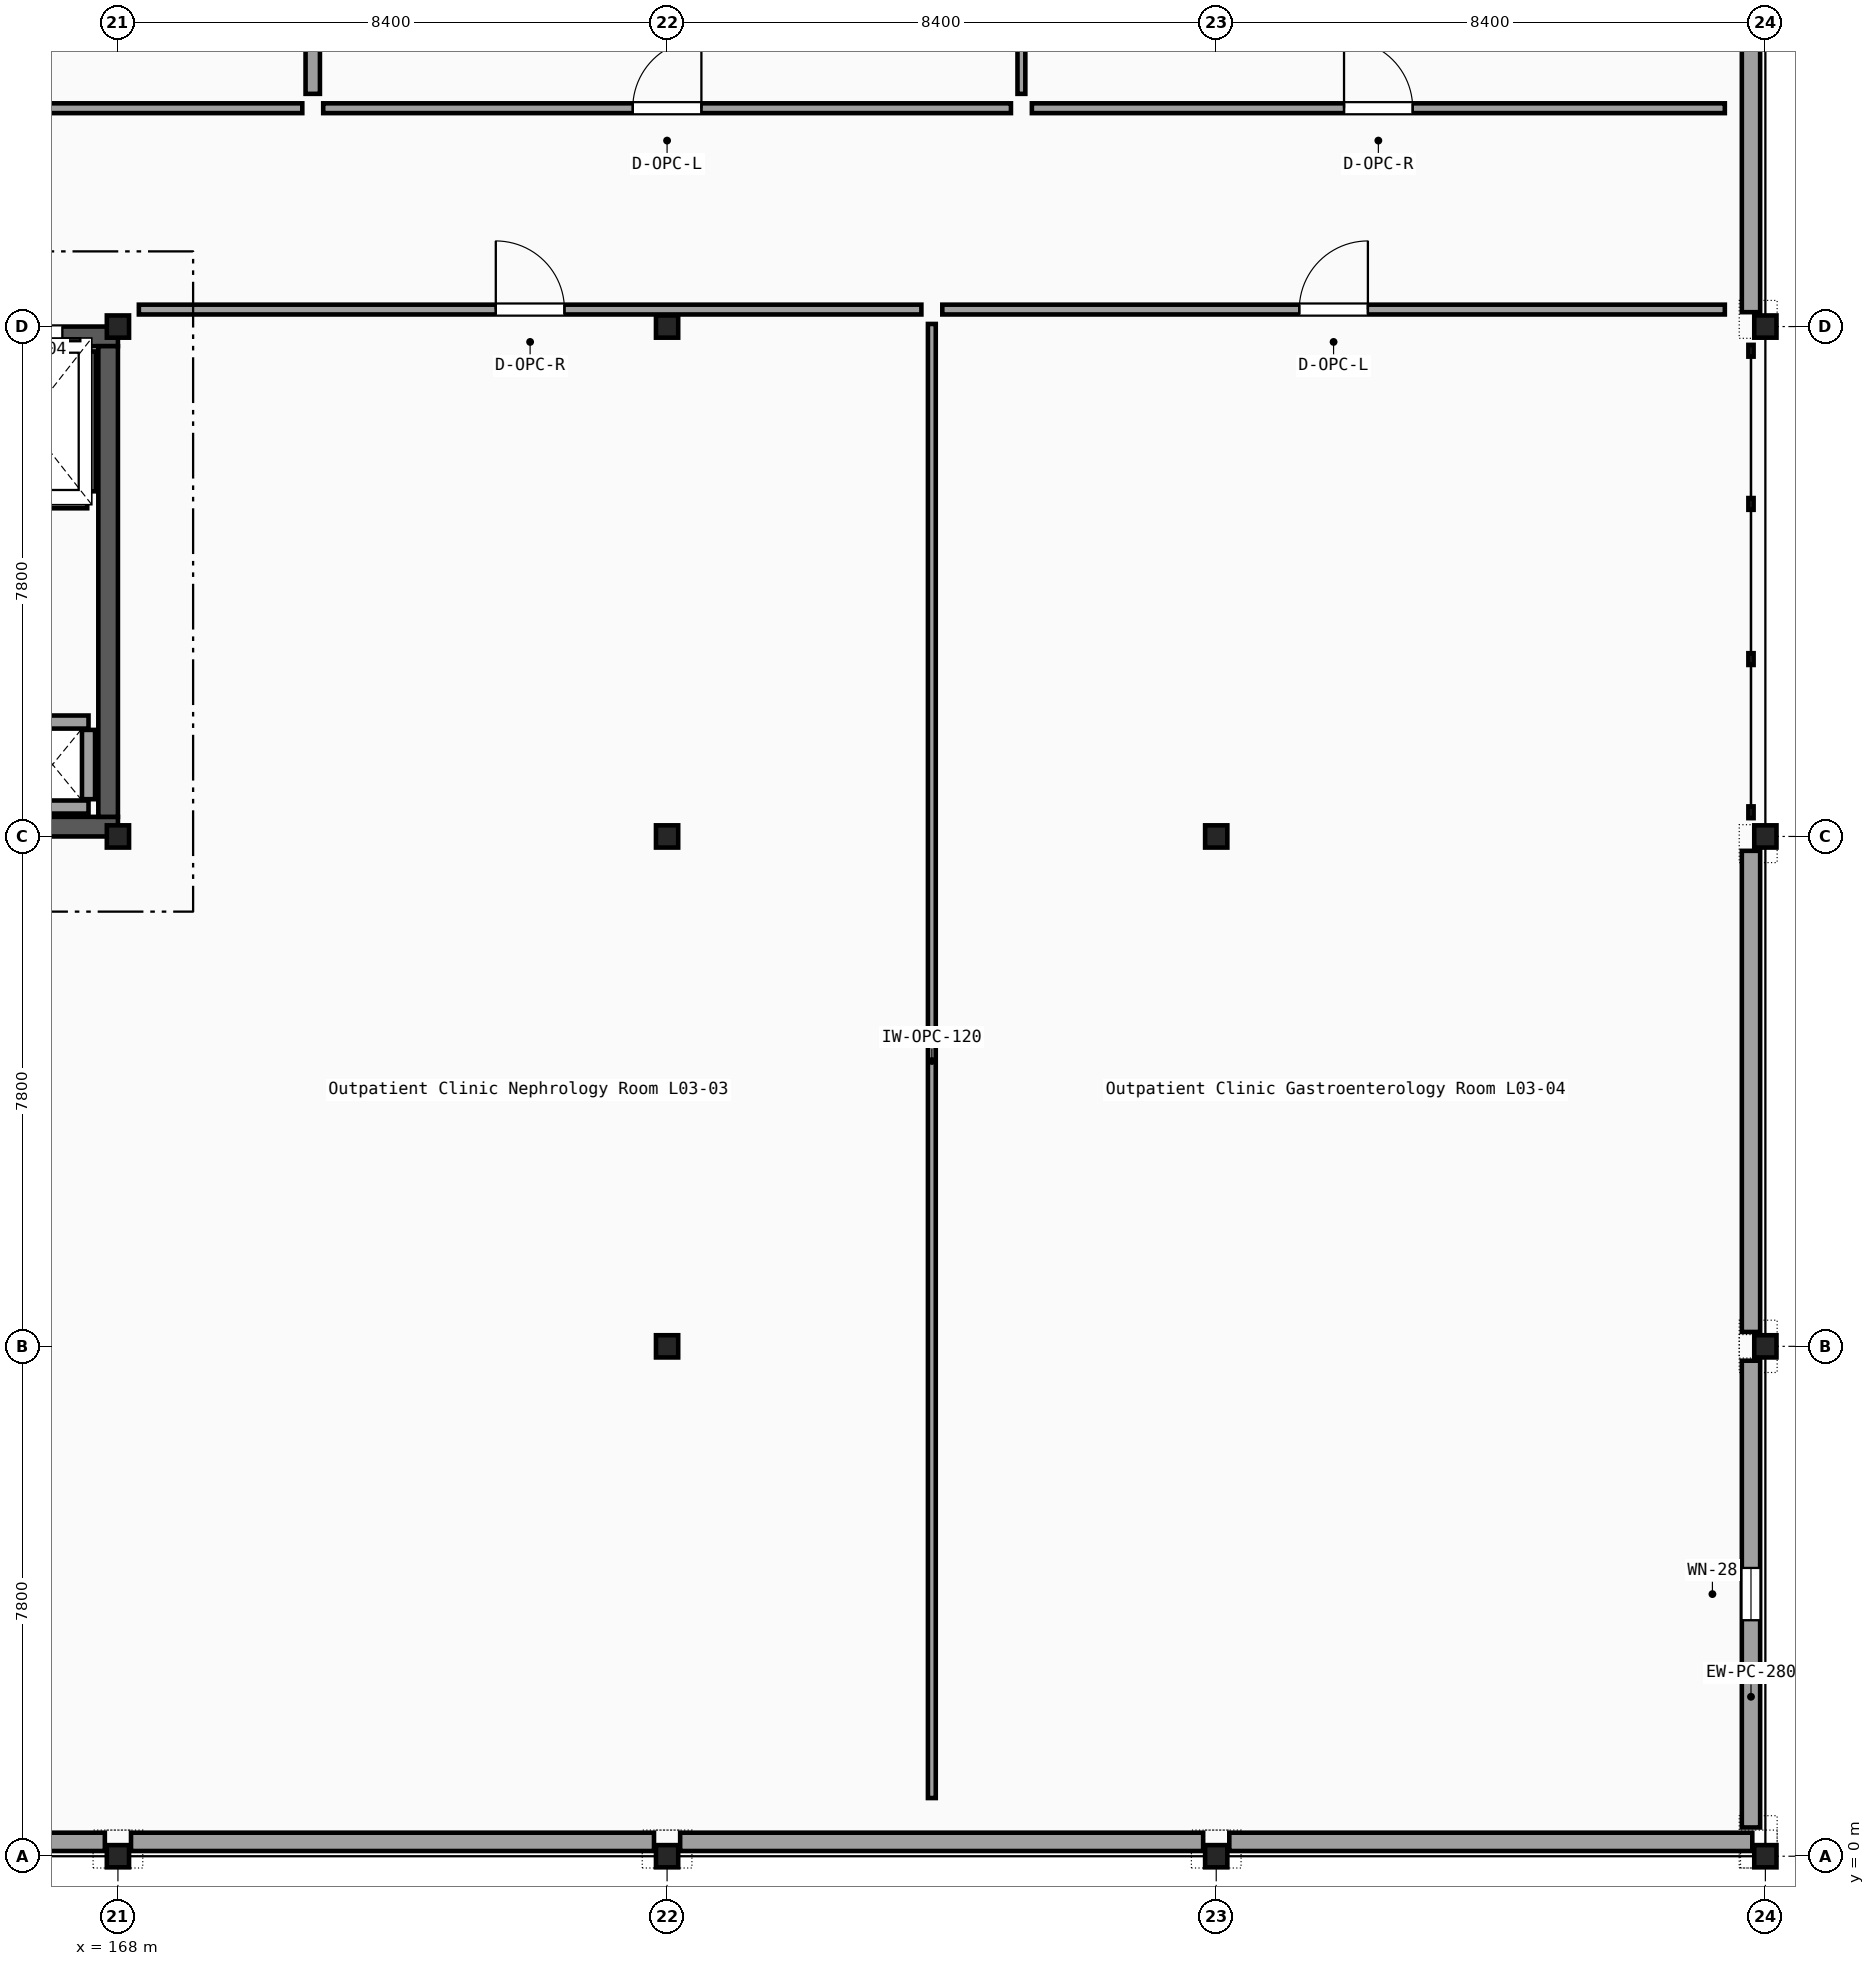
"""IFC4 building model, lengths in metres.
Left out: names, types, materials, properties, quantities, classifications, styles, units other than length and angle.
Written with IfcOpenShell. Run it as: python <this file> out.ifc"""

import sys

from ifc_helpers import new_model, si_unit, direction, frame, frame_2d, origin, origin_2d, place, context, subcontext, project, spatial, rectangle, i_section, extrude, element, fill, save


model = new_model("IFC4")
c1 = context("Model", 3, precision=1e-05, world=origin(), true_north=direction((0.0, 1.0)))
c2 = subcontext(c1, "Body", "Model", "MODEL_VIEW")
j1 = project(units=[si_unit("LENGTHUNIT", "METRE"), si_unit("PLANEANGLEUNIT", "RADIAN")], contexts=[c1])
p1 = place(None, origin())
s1 = spatial("IfcSite", under=j1, at=p1, CompositionType="ELEMENT")
p2 = place(p1, origin())
s2 = spatial("IfcBuilding", under=s1, at=p2, CompositionType="ELEMENT")
p3 = place(p2, frame((0.0, 0.0, 14.85)))
s3 = spatial("IfcBuildingStorey", under=s2, at=p3, CompositionType="ELEMENT", Elevation=14.85)
for number, where, z_axis, x_axis in (
    (1, (168.0, 0.0, 0.0), (0.0, 0.0, 1.0), (1.0, 0.0, 0.0)),
    (2, (168.0, 15.6, 0.0), (0.0, 0.0, 1.0), (1.0, 0.0, 0.0)),
    (3, (168.0, 23.4, 0.0), (0.0, 0.0, 1.0), (1.0, 0.0, 0.0)),
    (4, (176.4, 0.0, 0.0), (0.0, 0.0, 1.0), (1.0, 0.0, 0.0)),
    (5, (176.4, 7.8, 0.0), (0.0, 0.0, 1.0), (1.0, 0.0, 0.0)),
    (6, (176.4, 15.6, 0.0), (0.0, 0.0, 1.0), (1.0, 0.0, 0.0)),
    (7, (176.4, 23.4, 0.0), (0.0, 0.0, 1.0), (1.0, 0.0, 0.0)),
    (8, (184.8, 0.0, 0.0), (0.0, 0.0, 1.0), (1.0, 0.0, 0.0)),
    (9, (184.8, 15.6, 0.0), (0.0, 0.0, 1.0), (1.0, 0.0, 0.0)),
    (10, (193.2, 0.0, 0.0), (0.0, 0.0, 1.0), (1.0, 0.0, 0.0)),
    (11, (193.2, 7.8, 0.0), (0.0, 0.0, 1.0), (1.0, 0.0, 0.0)),
    (12, (193.2, 15.6, 0.0), (0.0, 0.0, 1.0), (1.0, 0.0, 0.0)),
    (13, (193.2, 23.4, 0.0), (0.0, 0.0, 1.0), (1.0, 0.0, 0.0)),
):
    element("IfcColumn", number, at=place(p3, frame(where, z_axis=z_axis, x_axis=x_axis)), inside=s3, PredefinedType="COLUMN", context=c2, shape_type="SweptSolid", body=[
        extrude(i_section(OverallWidth=0.3, OverallDepth=0.34, WebThickness=0.012, FlangeThickness=0.021, FilletRadius=0.027, at=origin_2d()), origin(), (0.0, 0.0, 1.0), 4.05),
    ])
p4 = place(p3, frame((159.8, 0.22, 0.0), z_axis=(0.0, 0.0, 1.0), x_axis=(1.0, 0.0, 0.0)))
e14 = element("IfcWall", 14, at=p4, inside=s3, PredefinedType="SOLIDWALL", context=c2, shape_type="SweptSolid", body=[
    extrude(rectangle(XDim=8.0, YDim=0.28, at=frame_2d((4.0, 0.0))), origin(), (0.0, 0.0, 1.0), 3.4),
])
p5 = place(p4, frame((3.15, 0.0, 0.95)))
e15 = element("IfcOpeningElement", 15, at=p5, cuts=e14, PredefinedType="OPENING", context=c2, shape_type="SweptSolid", body=[
    extrude(rectangle(XDim=1.7, YDim=1.55, at=frame_2d((0.85, 0.775))), frame((0.0, 0.15, 0.0), z_axis=(0.0, -1.0, 0.0), x_axis=(1.0, 0.0, 0.0)), (0.0, 0.0, 1.0), 0.3),
])
for number, where, z_axis, x_axis in (
    (16, (168.2, 0.22, 0.0), (0.0, 0.0, 1.0), (1.0, 0.0, 0.0)),
    (17, (176.6, 0.22, 0.0), (0.0, 0.0, 1.0), (1.0, 0.0, 0.0)),
    (18, (185.0, 0.22, 0.0), (0.0, 0.0, 1.0), (1.0, 0.0, 0.0)),
):
    element("IfcWall", number, at=place(p3, frame(where, z_axis=z_axis, x_axis=x_axis)), inside=s3, PredefinedType="SOLIDWALL", context=c2, shape_type="SweptSolid", body=[
        extrude(rectangle(XDim=8.0, YDim=0.28, at=frame_2d((4.0, 0.0))), origin(), (0.0, 0.0, 1.0), 3.4),
    ])
p6 = place(p3, frame((192.98, 0.44, 0.0), z_axis=(0.0, 0.0, 1.0), x_axis=(0.0, 1.0, 0.0)))
e19 = element("IfcWall", 19, at=p6, inside=s3, PredefinedType="SOLIDWALL", context=c2, shape_type="SweptSolid", body=[
    extrude(rectangle(XDim=7.14, YDim=0.28, at=frame_2d((3.57, 0.0))), origin(), (0.0, 0.0, 1.0), 3.3),
])
p7 = place(p6, frame((3.17, 0.0, 0.95)))
e20 = element("IfcOpeningElement", 20, at=p7, cuts=e19, PredefinedType="OPENING", context=c2, shape_type="SweptSolid", body=[
    extrude(rectangle(XDim=0.8, YDim=1.65, at=frame_2d((0.4, 0.825))), frame((0.0, 0.15, 0.0), z_axis=(0.0, -1.0, 0.0), x_axis=(1.0, 0.0, 0.0)), (0.0, 0.0, 1.0), 0.3),
])
for number, where, z_axis, x_axis in (
    (21, (192.98, 8.02, 0.0), (0.0, 0.0, 1.0), (0.0, 1.0, 0.0)),
    (22, (192.98, 23.62, 0.0), (0.0, 0.0, 1.0), (0.0, 1.0, 0.0)),
):
    element("IfcWall", number, at=place(p3, frame(where, z_axis=z_axis, x_axis=x_axis)), inside=s3, PredefinedType="SOLIDWALL", context=c2, shape_type="SweptSolid", body=[
        extrude(rectangle(XDim=7.36, YDim=0.28, at=frame_2d((3.68, 0.0))), origin(), (0.0, 0.0, 1.0), 3.3),
    ])
p8 = place(p3, frame((159.6, 15.75, 0.0), z_axis=(0.0, 0.0, 1.0), x_axis=(1.0, 0.0, 0.0)))
e23 = element("IfcWall", 23, at=p8, inside=s3, PredefinedType="SHEAR", context=c2, shape_type="SweptSolid", body=[
    extrude(rectangle(XDim=8.4, YDim=0.3, at=frame_2d((4.2, 0.0))), origin(), (0.0, 0.0, 1.0), 3.82),
])
p9 = place(p3, frame((159.6, 23.25, 0.0), z_axis=(0.0, 0.0, 1.0), x_axis=(1.0, 0.0, 0.0)))
e24 = element("IfcWall", 24, at=p9, inside=s3, PredefinedType="SHEAR", context=c2, shape_type="SweptSolid", body=[
    extrude(rectangle(XDim=8.4, YDim=0.3, at=frame_2d((4.2, 0.0))), origin(), (0.0, 0.0, 1.0), 3.82),
])
p10 = place(p9, frame((1.38, 0.0, 0.0)))
e25 = element("IfcOpeningElement", 25, at=p10, cuts=e24, PredefinedType="OPENING", context=c2, shape_type="SweptSolid", body=[
    extrude(rectangle(XDim=1.2, YDim=2.15, at=frame_2d((0.6, 1.075))), frame((0.0, 0.16, 0.0), z_axis=(0.0, -1.0, 0.0), x_axis=(1.0, 0.0, 0.0)), (0.0, 0.0, 1.0), 0.32),
])
p11 = place(p9, frame((4.43, 0.0, 0.0)))
e26 = element("IfcOpeningElement", 26, at=p11, cuts=e24, PredefinedType="OPENING", context=c2, shape_type="SweptSolid", body=[
    extrude(rectangle(XDim=1.1, YDim=2.15, at=frame_2d((0.55, 1.075))), frame((0.0, 0.16, 0.0), z_axis=(0.0, -1.0, 0.0), x_axis=(1.0, 0.0, 0.0)), (0.0, 0.0, 1.0), 0.32),
])
p12 = place(p9, frame((6.45, 0.0, 0.0)))
e27 = element("IfcOpeningElement", 27, at=p12, cuts=e24, PredefinedType="OPENING", context=c2, shape_type="SweptSolid", body=[
    extrude(rectangle(XDim=1.1, YDim=2.15, at=frame_2d((0.55, 1.075))), frame((0.0, 0.16, 0.0), z_axis=(0.0, -1.0, 0.0), x_axis=(1.0, 0.0, 0.0)), (0.0, 0.0, 1.0), 0.32),
])
p13 = place(p3, frame((167.85, 15.9, 0.0), z_axis=(0.0, 0.0, 1.0), x_axis=(0.0, 1.0, 0.0)))
e28 = element("IfcWall", 28, at=p13, inside=s3, PredefinedType="SHEAR", context=c2, shape_type="SweptSolid", body=[
    extrude(rectangle(XDim=7.2, YDim=0.3, at=frame_2d((3.6, 0.0))), origin(), (0.0, 0.0, 1.0), 3.82),
])
for number, where, z_axis, x_axis in (
    (29, (166.45, 16.05, 0.0), (0.0, 0.0, 1.0), (1.0, 0.0, 0.0)),
    (30, (166.45, 17.35, 0.0), (0.0, 0.0, 1.0), (1.0, 0.0, 0.0)),
):
    element("IfcWall", number, at=place(p3, frame(where, z_axis=z_axis, x_axis=x_axis)), inside=s3, PredefinedType="PARTITIONING", context=c2, shape_type="SweptSolid", body=[
        extrude(rectangle(XDim=1.1, YDim=0.2, at=frame_2d((0.55, 0.0))), origin(), (0.0, 0.0, 1.0), 3.2),
    ])
p14 = place(p3, frame((167.55, 16.17, 0.0), z_axis=(0.0, 0.0, 1.0), x_axis=(0.0, 1.0, 0.0)))
e31 = element("IfcWall", 31, at=p14, inside=s3, PredefinedType="PARTITIONING", context=c2, shape_type="SweptSolid", body=[
    extrude(rectangle(XDim=1.06, YDim=0.2, at=frame_2d((0.53, 0.0))), origin(), (0.0, 0.0, 1.0), 3.2),
])
p15 = place(p3, frame((167.56, 20.88, 0.0), z_axis=(0.0, 0.0, 1.0), x_axis=(0.0, 1.0, 0.0)))
e32 = element("IfcWall", 32, at=p15, inside=s3, PredefinedType="PARTITIONING", context=c2, shape_type="SweptSolid", body=[
    extrude(rectangle(XDim=2.14, YDim=0.2, at=frame_2d((1.07, 0.0))), origin(), (0.0, 0.0, 1.0), 3.2),
])
p16 = place(p3, frame((165.67, 20.72, 0.0), z_axis=(0.0, 0.0, 1.0), x_axis=(1.0, 0.0, 0.0)))
e33 = element("IfcWall", 33, at=p16, inside=s3, PredefinedType="PARTITIONING", context=c2, shape_type="SweptSolid", body=[
    extrude(rectangle(XDim=1.86, YDim=0.2, at=frame_2d((0.93, 0.0))), origin(), (0.0, 0.0, 1.0), 3.2),
])
p17 = place(p3, frame((168.32, 23.66, 0.0), z_axis=(0.0, 0.0, 1.0), x_axis=(1.0, 0.0, 0.0)))
e34 = element("IfcWall", 34, at=p17, inside=s3, PredefinedType="PARTITIONING", context=c2, shape_type="SweptSolid", body=[
    extrude(rectangle(XDim=11.97, YDim=0.15, at=frame_2d((5.985, 0.0))), origin(), (0.0, 0.0, 1.0), 3.3),
])
p18 = place(p17, frame((5.46, 0.0, 0.0)))
e35 = element("IfcOpeningElement", 35, at=p18, cuts=e34, PredefinedType="OPENING", context=c2, shape_type="SweptSolid", body=[
    extrude(rectangle(XDim=1.05, YDim=2.15, at=frame_2d((0.525, 1.075))), frame((0.0, 0.085, 0.0), z_axis=(0.0, -1.0, 0.0), x_axis=(1.0, 0.0, 0.0)), (0.0, 0.0, 1.0), 0.17),
])
p19 = place(p3, frame((180.45, 0.89, 0.0), z_axis=(0.0, 0.0, 1.0), x_axis=(0.0, 1.0, 0.0)))
e36 = element("IfcWall", 36, at=p19, inside=s3, PredefinedType="PARTITIONING", context=c2, shape_type="SweptSolid", body=[
    extrude(rectangle(XDim=22.55, YDim=0.12, at=frame_2d((11.275, 0.0))), origin(), (0.0, 0.0, 1.0), 3.3),
])
p20 = place(p3, frame((180.61, 23.66, 0.0), z_axis=(0.0, 0.0, 1.0), x_axis=(1.0, 0.0, 0.0)))
e37 = element("IfcWall", 37, at=p20, inside=s3, PredefinedType="PARTITIONING", context=c2, shape_type="SweptSolid", body=[
    extrude(rectangle(XDim=11.97, YDim=0.15, at=frame_2d((5.985, 0.0))), origin(), (0.0, 0.0, 1.0), 3.3),
])
p21 = place(p20, frame((5.46, 0.0, 0.0)))
e38 = element("IfcOpeningElement", 38, at=p21, cuts=e37, PredefinedType="OPENING", context=c2, shape_type="SweptSolid", body=[
    extrude(rectangle(XDim=1.05, YDim=2.15, at=frame_2d((0.525, 1.075))), frame((0.0, 0.085, 0.0), z_axis=(0.0, -1.0, 0.0), x_axis=(1.0, 0.0, 0.0)), (0.0, 0.0, 1.0), 0.17),
])
p22 = place(p3, frame((160.22, 26.74, 0.0), z_axis=(0.0, 0.0, 1.0), x_axis=(1.0, 0.0, 0.0)))
e39 = element("IfcWall", 39, at=p22, inside=s3, PredefinedType="PARTITIONING", context=c2, shape_type="SweptSolid", body=[
    extrude(rectangle(XDim=10.6, YDim=0.15, at=frame_2d((5.3, 0.0))), origin(), (0.0, 0.0, 1.0), 3.4),
])
p23 = place(p22, frame((4.4, 0.0, 0.0)))
e40 = element("IfcOpeningElement", 40, at=p23, cuts=e39, PredefinedType="OPENING", context=c2, shape_type="SweptSolid", body=[
    extrude(rectangle(XDim=1.8, YDim=2.4, at=frame_2d((0.9, 1.2))), frame((0.0, 0.085, 0.0), z_axis=(0.0, -1.0, 0.0), x_axis=(1.0, 0.0, 0.0)), (0.0, 0.0, 1.0), 0.17),
])
p24 = place(p3, frame((170.98, 26.96, 0.0), z_axis=(0.0, 0.0, 1.0), x_axis=(0.0, 1.0, 0.0)))
e41 = element("IfcWall", 41, at=p24, inside=s3, PredefinedType="PARTITIONING", context=c2, shape_type="SweptSolid", body=[
    extrude(rectangle(XDim=11.35, YDim=0.22, at=frame_2d((5.675, 0.0))), origin(), (0.0, 0.0, 1.0), 3.3),
])
p25 = place(p3, frame((171.14, 26.74, 0.0), z_axis=(0.0, 0.0, 1.0), x_axis=(1.0, 0.0, 0.0)))
e42 = element("IfcWall", 42, at=p25, inside=s3, PredefinedType="PARTITIONING", context=c2, shape_type="SweptSolid", body=[
    extrude(rectangle(XDim=10.52, YDim=0.15, at=frame_2d((5.26, 0.0))), origin(), (0.0, 0.0, 1.0), 3.4),
])
p26 = place(p25, frame((4.735, 0.0, 0.0)))
e43 = element("IfcOpeningElement", 43, at=p26, cuts=e42, PredefinedType="OPENING", context=c2, shape_type="SweptSolid", body=[
    extrude(rectangle(XDim=1.05, YDim=2.15, at=frame_2d((0.525, 1.075))), frame((0.0, 0.085, 0.0), z_axis=(0.0, -1.0, 0.0), x_axis=(1.0, 0.0, 0.0)), (0.0, 0.0, 1.0), 0.17),
])
p27 = place(p3, frame((181.82, 26.96, 0.0), z_axis=(0.0, 0.0, 1.0), x_axis=(0.0, 1.0, 0.0)))
e44 = element("IfcWall", 44, at=p27, inside=s3, PredefinedType="PARTITIONING", context=c2, shape_type="SweptSolid", body=[
    extrude(rectangle(XDim=11.35, YDim=0.12, at=frame_2d((5.675, 0.0))), origin(), (0.0, 0.0, 1.0), 3.3),
])
p28 = place(p3, frame((181.98, 26.74, 0.0), z_axis=(0.0, 0.0, 1.0), x_axis=(1.0, 0.0, 0.0)))
e45 = element("IfcWall", 45, at=p28, inside=s3, PredefinedType="PARTITIONING", context=c2, shape_type="SweptSolid", body=[
    extrude(rectangle(XDim=10.6, YDim=0.15, at=frame_2d((5.3, 0.0))), origin(), (0.0, 0.0, 1.0), 3.77),
])
p29 = place(p28, frame((4.775, 0.0, 0.0)))
e46 = element("IfcOpeningElement", 46, at=p29, cuts=e45, PredefinedType="OPENING", context=c2, shape_type="SweptSolid", body=[
    extrude(rectangle(XDim=1.05, YDim=2.15, at=frame_2d((0.525, 1.075))), frame((0.0, 0.085, 0.0), z_axis=(0.0, -1.0, 0.0), x_axis=(1.0, 0.0, 0.0)), (0.0, 0.0, 1.0), 0.17),
])
p30 = place(p7, origin())
e47 = element("IfcWindow", 47, at=p30, inside=s3, PartitioningType="SINGLE_PANEL", PredefinedType="WINDOW", context=c2, shape_type="SweptSolid", body=[
    extrude(rectangle(XDim=0.8, YDim=1.65, at=frame_2d((0.4, 0.825))), frame((0.0, 0.03, 0.0), z_axis=(0.0, -1.0, 0.0), x_axis=(1.0, 0.0, 0.0)), (0.0, 0.0, 1.0), 0.06),
])
fill(e20, e47)
p31 = place(p12, origin())
e48 = element("IfcDoor", 48, at=p31, inside=s3, OperationType="DOUBLE_DOOR_SLIDING", PredefinedType="DOOR", context=c2, shape_type="SweptSolid", body=[
    extrude(rectangle(XDim=1.1, YDim=2.15, at=frame_2d((0.55, 1.075))), frame((0.0, 0.025, 0.0), z_axis=(0.0, -1.0, 0.0), x_axis=(1.0, 0.0, 0.0)), (0.0, 0.0, 1.0), 0.05),
])
fill(e27, e48)
p32 = place(p18, origin())
e49 = element("IfcDoor", 49, at=p32, inside=s3, OperationType="SINGLE_SWING_LEFT", PredefinedType="DOOR", context=c2, shape_type="SweptSolid", body=[
    extrude(rectangle(XDim=1.05, YDim=2.15, at=frame_2d((0.525, 1.075))), frame((0.0, 0.025, 0.0), z_axis=(0.0, -1.0, 0.0), x_axis=(1.0, 0.0, 0.0)), (0.0, 0.0, 1.0), 0.05),
])
fill(e35, e49)
p33 = place(p21, origin())
e50 = element("IfcDoor", 50, at=p33, inside=s3, OperationType="SINGLE_SWING_RIGHT", PredefinedType="DOOR", context=c2, shape_type="SweptSolid", body=[
    extrude(rectangle(XDim=1.05, YDim=2.15, at=frame_2d((0.525, 1.075))), frame((0.0, 0.025, 0.0), z_axis=(0.0, -1.0, 0.0), x_axis=(1.0, 0.0, 0.0)), (0.0, 0.0, 1.0), 0.05),
])
fill(e38, e50)
p34 = place(p26, origin())
e51 = element("IfcDoor", 51, at=p34, inside=s3, OperationType="SINGLE_SWING_RIGHT", PredefinedType="DOOR", context=c2, shape_type="SweptSolid", body=[
    extrude(rectangle(XDim=1.05, YDim=2.15, at=frame_2d((0.525, 1.075))), frame((0.0, 0.025, 0.0), z_axis=(0.0, -1.0, 0.0), x_axis=(1.0, 0.0, 0.0)), (0.0, 0.0, 1.0), 0.05),
])
fill(e43, e51)
p35 = place(p29, origin())
e52 = element("IfcDoor", 52, at=p35, inside=s3, OperationType="SINGLE_SWING_LEFT", PredefinedType="DOOR", context=c2, shape_type="SweptSolid", body=[
    extrude(rectangle(XDim=1.05, YDim=2.15, at=frame_2d((0.525, 1.075))), frame((0.0, 0.025, 0.0), z_axis=(0.0, -1.0, 0.0), x_axis=(1.0, 0.0, 0.0)), (0.0, 0.0, 1.0), 0.05),
])
fill(e46, e52)
save(model, sys.argv[1])
